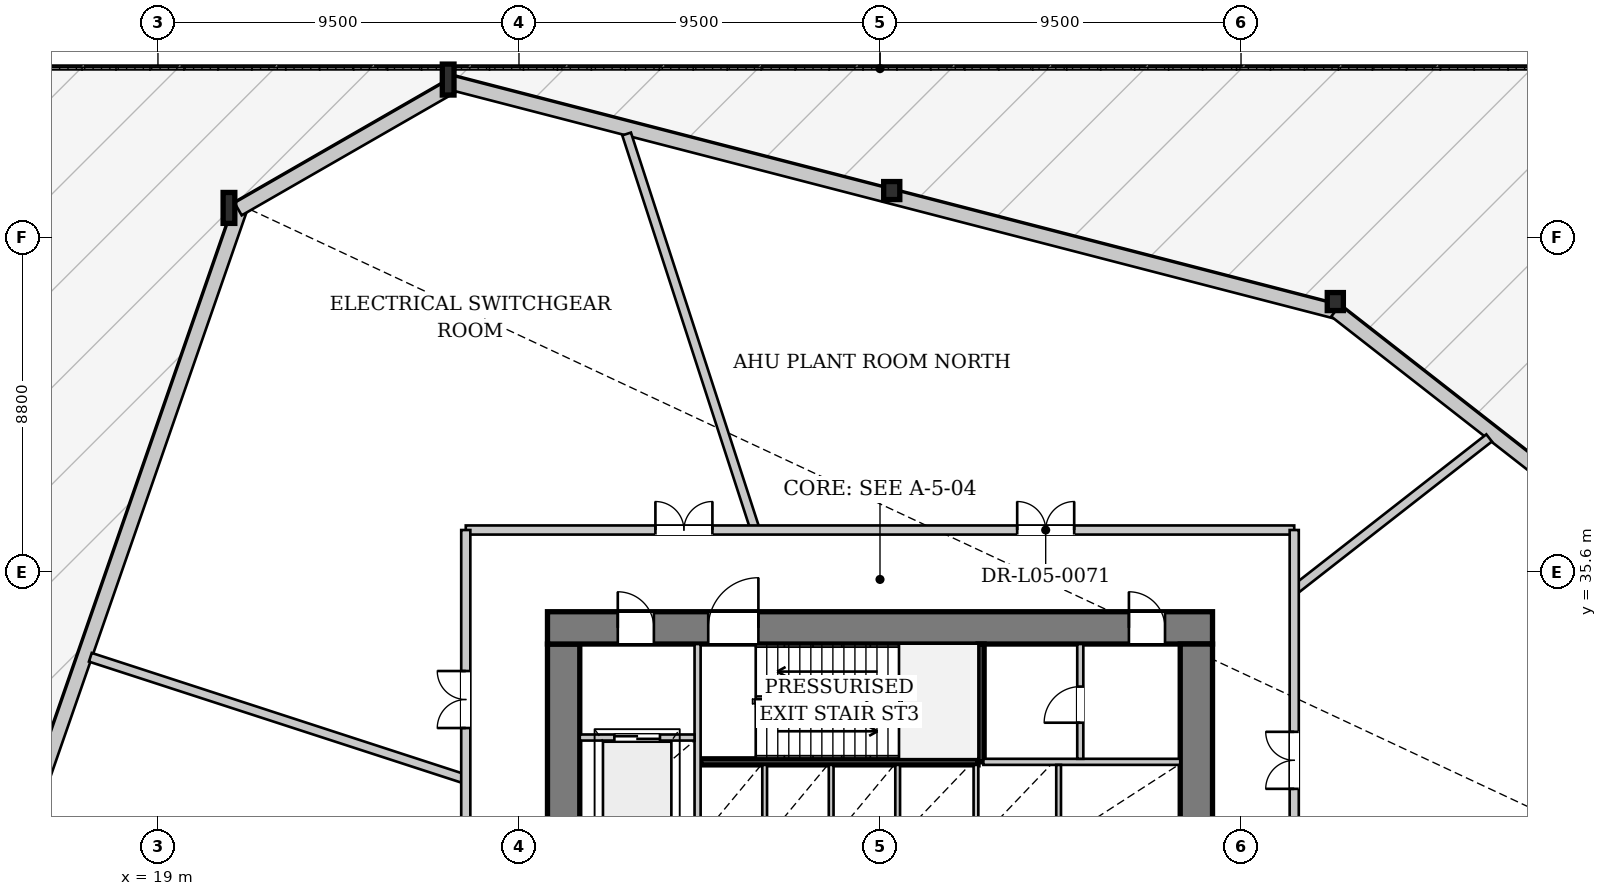
"""IFC4 building model, lengths in metres.
Left out: names, types, materials, properties, quantities, classifications, styles, units other than length and angle.
Written with IfcOpenShell. Run it as: python <this file> out.ifc"""

import sys

from ifc_helpers import new_model, si_unit, direction, frame, frame_2d, origin, origin_2d, place, context, subcontext, project, spatial, rectangle, i_section, extrude, source, transform, mapped, element, fill, save


model = new_model("IFC4")
c1 = context("Model", 3, precision=1e-05, world=origin(), true_north=direction((0.0, 1.0)))
c2 = subcontext(c1, "Body", "Model", "MODEL_VIEW")
j1 = project(units=[si_unit("LENGTHUNIT", "METRE"), si_unit("PLANEANGLEUNIT", "RADIAN")], contexts=[c1])
p1 = place(None, origin())
s1 = spatial("IfcSite", under=j1, at=p1, CompositionType="ELEMENT")
p2 = place(p1, origin())
s2 = spatial("IfcBuilding", under=s1, at=p2, CompositionType="ELEMENT")
p3 = place(p2, frame((0.0, 0.0, 24.6)))
s3 = spatial("IfcBuildingStorey", under=s2, at=p3, CompositionType="ELEMENT", Elevation=24.6)
m1 = source(origin(), c2, "Body", "SweptSolid", [
    extrude(i_section(OverallWidth=0.424, OverallDepth=0.474, WebThickness=0.043, FlangeThickness=0.068, at=origin_2d()), origin(), (0.0, 0.0, 1.0), 4.546),
])
p4 = place(p3, frame((50.108, 42.617, 0.0), z_axis=(-0.055693121898, 0.041407325925, 0.997588948181), x_axis=(-0.596651654511, -0.802500344654, 0.0)))
e1 = element("IfcColumn", 1, at=p4, inside=s3, PredefinedType="COLUMN", context=c2, shape_type="MappedRepresentation", body=[
    mapped(m1, transform((0.0, 0.0, 0.0), x_axis=(1.0, 0.0, 0.0), y_axis=(0.0, 1.0, 0.0), z_axis=(0.0, 0.0, 1.0), scale=1.0)),
])
m2 = source(origin(), c2, "Body", "SweptSolid", [
    extrude(i_section(OverallWidth=0.424, OverallDepth=0.474, WebThickness=0.043, FlangeThickness=0.068, at=origin_2d()), origin(), (0.0, 0.0, 1.0), 4.545),
])
p5 = place(p3, frame((38.458, 45.629, 0.0), z_axis=(-0.065805870044, 0.001074381552, 0.997831866184), x_axis=(-0.016324355083, -0.999866748838, 0.0)))
e2 = element("IfcColumn", 2, at=p5, inside=s3, PredefinedType="COLUMN", context=c2, shape_type="MappedRepresentation", body=[
    mapped(m2, transform((0.0, 0.0, 0.0), x_axis=(1.0, 0.0, 0.0), y_axis=(0.0, 1.0, 0.0), z_axis=(0.0, 0.0, 1.0), scale=1.0)),
])
m3 = source(origin(), c2, "Body", "SweptSolid", [
    extrude(i_section(OverallWidth=0.308, OverallDepth=0.814, WebThickness=0.021, FlangeThickness=0.04, at=origin_2d()), origin(), (0.0, 0.0, 1.0), 4.552),
])
p6 = place(p3, frame((26.809, 48.642, 0.0), z_axis=(-0.075739179484, -0.03921058088, 0.996356415666), x_axis=(0.459747973035, -0.888049436287, 0.0)))
e3 = element("IfcColumn", 3, at=p6, inside=s3, PredefinedType="COLUMN", context=c2, shape_type="MappedRepresentation", body=[
    mapped(m3, transform((0.0, 0.0, 0.0), x_axis=(1.0, 0.0, 0.0), y_axis=(0.0, 1.0, 0.0), z_axis=(0.0, 0.0, 1.0), scale=1.0)),
])
m4 = source(origin(), c2, "Body", "SweptSolid", [
    extrude(i_section(OverallWidth=0.308, OverallDepth=0.814, WebThickness=0.021, FlangeThickness=0.04, at=origin_2d()), origin(), (0.0, 0.0, 1.0), 4.552),
])
p7 = place(p3, frame((21.014, 45.309, 0.0), z_axis=(-0.064088836762, -0.059101169968, 0.996192588163), x_axis=(0.677922317054, -0.735133547078, 0.0)))
e4 = element("IfcColumn", 4, at=p7, inside=s3, PredefinedType="COLUMN", context=c2, shape_type="MappedRepresentation", body=[
    mapped(m4, transform((0.0, 0.0, 0.0), x_axis=(1.0, 0.0, 0.0), y_axis=(0.0, 1.0, 0.0), z_axis=(0.0, 0.0, 1.0), scale=1.0)),
])
p8 = place(p3, frame((15.064, 27.6, 0.0), z_axis=(0.0, 0.0, 1.0), x_axis=(0.328121673654, 0.944635467934, 0.0)))
e5 = element("IfcWall", 5, at=p8, inside=s3, PredefinedType="SOLIDWALL", context=c2, shape_type="SweptSolid", body=[
    extrude(rectangle(XDim=18.681, YDim=0.38, at=frame_2d((9.34, 0.0))), origin(), (0.0, 0.0, 1.0), 3.742),
])
p9 = place(p3, frame((21.109, 45.145, 0.0), z_axis=(0.0, 0.0, 1.0), x_axis=(0.866875523959, 0.498524649301, 0.0)))
e6 = element("IfcWall", 6, at=p9, inside=s3, PredefinedType="SOLIDWALL", context=c2, shape_type="SweptSolid", body=[
    extrude(rectangle(XDim=6.684, YDim=0.38, at=frame_2d((3.342, 0.0))), origin(), (0.0, 0.0, 1.0), 3.742),
])
p10 = place(p3, frame((26.761, 48.458, 0.0), z_axis=(0.0, 0.0, 1.0), x_axis=(0.968155984644, -0.250347736955, 0.0)))
e7 = element("IfcWall", 7, at=p10, inside=s3, PredefinedType="SOLIDWALL", context=c2, shape_type="SweptSolid", body=[
    extrude(rectangle(XDim=24.065, YDim=0.38, at=frame_2d((12.033, 0.0))), origin(), (0.0, 0.0, 1.0), 3.742),
])
p11 = place(p3, frame((49.991, 42.467, 0.0), z_axis=(0.0, 0.0, 1.0), x_axis=(0.788071128721, -0.615584190892, 0.0)))
e8 = element("IfcWall", 8, at=p11, inside=s3, PredefinedType="SOLIDWALL", context=c2, shape_type="SweptSolid", body=[
    extrude(rectangle(XDim=24.065, YDim=0.38, at=frame_2d((12.032, 0.0))), origin(), (0.0, 0.0, 1.0), 3.742),
])
p12 = place(p3, frame((29.675, 19.5, 0.0), z_axis=(0.0, 0.0, 1.0), x_axis=(0.0, 1.0, 0.0)))
e9 = element("IfcWall", 9, at=p12, inside=s3, PredefinedType="SHEAR", context=c2, shape_type="SweptSolid", body=[
    extrude(rectangle(XDim=14.2, YDim=0.85, at=frame_2d((7.1, 0.0))), origin(), (0.0, 0.0, 1.0), 4.45),
])
p13 = place(p12, frame((7.42, 0.0, 0.0)))
e10 = element("IfcOpeningElement", 10, at=p13, cuts=e9, PredefinedType="OPENING", context=c2, shape_type="SweptSolid", body=[
    extrude(rectangle(XDim=1.6, YDim=2.2, at=frame_2d((0.8, 1.1))), frame((0.0, 0.435, 0.0), z_axis=(0.0, -1.0, 0.0), x_axis=(1.0, 0.0, 0.0)), (0.0, 0.0, 1.0), 0.87),
])
p14 = place(p3, frame((29.25, 34.125, 0.0), z_axis=(0.0, 0.0, 1.0), x_axis=(1.0, 0.0, 0.0)))
e11 = element("IfcWall", 11, at=p14, inside=s3, PredefinedType="SHEAR", context=c2, shape_type="SweptSolid", body=[
    extrude(rectangle(XDim=17.5, YDim=0.85, at=frame_2d((8.75, 0.0))), origin(), (0.0, 0.0, 1.0), 4.45),
])
p15 = place(p14, frame((1.85, 0.0, 0.0)))
e12 = element("IfcOpeningElement", 12, at=p15, cuts=e11, PredefinedType="OPENING", context=c2, shape_type="SweptSolid", body=[
    extrude(rectangle(XDim=0.95, YDim=2.1, at=frame_2d((0.475, 1.05))), frame((0.0, 0.435, 0.0), z_axis=(0.0, -1.0, 0.0), x_axis=(1.0, 0.0, 0.0)), (0.0, 0.0, 1.0), 0.87),
])
p16 = place(p14, frame((4.23, 0.0, 0.0)))
e13 = element("IfcOpeningElement", 13, at=p16, cuts=e11, PredefinedType="OPENING", context=c2, shape_type="SweptSolid", body=[
    extrude(rectangle(XDim=1.32, YDim=2.2, at=frame_2d((0.66, 1.1))), frame((0.0, 0.435, 0.0), z_axis=(0.0, -1.0, 0.0), x_axis=(1.0, 0.0, 0.0)), (0.0, 0.0, 1.0), 0.87),
])
p17 = place(p14, frame((15.3, 0.0, 0.0)))
e14 = element("IfcOpeningElement", 14, at=p17, cuts=e11, PredefinedType="OPENING", context=c2, shape_type="SweptSolid", body=[
    extrude(rectangle(XDim=0.95, YDim=2.1, at=frame_2d((0.475, 1.05))), frame((0.0, 0.435, 0.0), z_axis=(0.0, -1.0, 0.0), x_axis=(1.0, 0.0, 0.0)), (0.0, 0.0, 1.0), 0.87),
])
p18 = place(p3, frame((46.325, 33.7, 0.0), z_axis=(0.0, 0.0, 1.0), x_axis=(0.0, -1.0, 0.0)))
e15 = element("IfcWall", 15, at=p18, inside=s3, PredefinedType="SHEAR", context=c2, shape_type="SweptSolid", body=[
    extrude(rectangle(XDim=14.2, YDim=0.85, at=frame_2d((7.1, 0.0))), origin(), (0.0, 0.0, 1.0), 4.45),
])
p19 = place(p18, frame((5.18, 0.0, 0.0)))
e16 = element("IfcOpeningElement", 16, at=p19, cuts=e15, PredefinedType="OPENING", context=c2, shape_type="SweptSolid", body=[
    extrude(rectangle(XDim=1.6, YDim=2.2, at=frame_2d((0.8, 1.1))), frame((0.0, 0.435, 0.0), z_axis=(0.0, -1.0, 0.0), x_axis=(1.0, 0.0, 0.0)), (0.0, 0.0, 1.0), 0.87),
])
p20 = place(p3, frame((33.28, 30.6, 0.0), z_axis=(0.0, 0.0, 1.0), x_axis=(1.0, 0.0, 0.0)))
e17 = element("IfcWall", 17, at=p20, inside=s3, PredefinedType="PARTITIONING", context=c2, shape_type="SweptSolid", body=[
    extrude(rectangle(XDim=7.3, YDim=0.16, at=frame_2d((3.65, 0.0))), origin(), (0.0, 0.0, 1.0), 4.45),
])
p21 = place(p3, frame((40.66, 30.6, 0.0), z_axis=(0.0, 0.0, 1.0), x_axis=(0.0, 1.0, 0.0)))
e18 = element("IfcWall", 18, at=p21, inside=s3, PredefinedType="PARTITIONING", context=c2, shape_type="SweptSolid", body=[
    extrude(rectangle(XDim=3.1, YDim=0.16, at=frame_2d((1.55, 0.0))), origin(), (0.0, 0.0, 1.0), 4.45),
])
p22 = place(p3, frame((33.2, 28.44, 0.0), z_axis=(0.0, 0.0, 1.0), x_axis=(0.0, 1.0, 0.0)))
e19 = element("IfcWall", 19, at=p22, inside=s3, PredefinedType="PARTITIONING", context=c2, shape_type="SweptSolid", body=[
    extrude(rectangle(XDim=5.26, YDim=0.16, at=frame_2d((2.63, 0.0))), origin(), (0.0, 0.0, 1.0), 4.45),
])
p23 = place(p3, frame((30.1, 31.24, 0.0), z_axis=(0.0, 0.0, 1.0), x_axis=(1.0, 0.0, 0.0)))
e20 = element("IfcWall", 20, at=p23, inside=s3, PredefinedType="PARTITIONING", context=c2, shape_type="SweptSolid", body=[
    extrude(rectangle(XDim=3.02, YDim=0.16, at=frame_2d((1.51, 0.0))), origin(), (0.0, 0.0, 1.0), 4.45),
])
p24 = place(p23, frame((0.91, 0.0, 0.0)))
e21 = element("IfcOpeningElement", 21, at=p24, cuts=e20, PredefinedType="OPENING", context=c2, shape_type="SweptSolid", body=[
    extrude(rectangle(XDim=1.2, YDim=2.2, at=frame_2d((0.6, 1.1))), frame((0.0, 0.09, 0.0), z_axis=(0.0, -1.0, 0.0), x_axis=(1.0, 0.0, 0.0)), (0.0, 0.0, 1.0), 0.18),
])
p25 = place(p3, frame((40.72, 30.6, 0.0), z_axis=(0.0, 0.0, 1.0), x_axis=(1.0, 0.0, 0.0)))
e22 = element("IfcWall", 22, at=p25, inside=s3, PredefinedType="PARTITIONING", context=c2, shape_type="SweptSolid", body=[
    extrude(rectangle(XDim=5.18, YDim=0.16, at=frame_2d((2.59, 0.0))), origin(), (0.0, 0.0, 1.0), 4.45),
])
for number, where, z_axis, x_axis in (
    (23, (34.965, 28.6, 0.0), (0.0, 0.0, 1.0), (0.0, 1.0, 0.0)),
    (24, (36.715, 28.6, 0.0), (0.0, 0.0, 1.0), (0.0, 1.0, 0.0)),
    (25, (38.465, 28.6, 0.0), (0.0, 0.0, 1.0), (0.0, 1.0, 0.0)),
    (26, (40.525, 28.6, 0.0), (0.0, 0.0, 1.0), (0.0, 1.0, 0.0)),
    (27, (42.7, 28.6, 0.0), (0.0, 0.0, 1.0), (0.0, 1.0, 0.0)),
):
    element("IfcWall", number, at=place(p3, frame(where, z_axis=z_axis, x_axis=x_axis)), inside=s3, PredefinedType="PARTITIONING", context=c2, shape_type="SweptSolid", body=[
        extrude(rectangle(XDim=1.92, YDim=0.125, at=frame_2d((0.96, 0.0))), origin(), (0.0, 0.0, 1.0), 4.45),
    ])
p26 = place(p3, frame((43.27, 30.68, 0.0), z_axis=(0.0, 0.0, 1.0), x_axis=(0.0, 1.0, 0.0)))
e28 = element("IfcWall", 28, at=p26, inside=s3, PredefinedType="PARTITIONING", context=c2, shape_type="SweptSolid", body=[
    extrude(rectangle(XDim=3.02, YDim=0.16, at=frame_2d((1.51, 0.0))), origin(), (0.0, 0.0, 1.0), 4.45),
])
p27 = place(p26, frame((0.95, 0.0, 0.0)))
e29 = element("IfcOpeningElement", 29, at=p27, cuts=e28, PredefinedType="OPENING", context=c2, shape_type="SweptSolid", body=[
    extrude(rectangle(XDim=0.95, YDim=2.1, at=frame_2d((0.475, 1.05))), frame((0.0, 0.09, 0.0), z_axis=(0.0, -1.0, 0.0), x_axis=(1.0, 0.0, 0.0)), (0.0, 0.0, 1.0), 0.18),
])
p28 = place(p3, frame((48.9, 35.116, 0.0), z_axis=(0.0, 0.0, 1.0), x_axis=(0.788019255292, 0.61565059351, 0.0)))
e30 = element("IfcWall", 30, at=p28, inside=s3, PredefinedType="PARTITIONING", context=c2, shape_type="SweptSolid", body=[
    extrude(rectangle(XDim=6.508, YDim=0.24, at=frame_2d((3.254, 0.0))), origin(), (0.0, 0.0, 1.0), 4.45),
])
p29 = place(p3, frame((34.718, 36.7, 0.0), z_axis=(0.0, 0.0, 1.0), x_axis=(-0.308999413899, 0.951062228358, 0.0)))
e31 = element("IfcWall", 31, at=p29, inside=s3, PredefinedType="PARTITIONING", context=c2, shape_type="SweptSolid", body=[
    extrude(rectangle(XDim=10.957, YDim=0.24, at=frame_2d((5.479, 0.0))), origin(), (0.0, 0.0, 1.0), 4.45),
])
p30 = place(p3, frame((27.1, 30.142, 0.0), z_axis=(0.0, 0.0, 1.0), x_axis=(-0.951057900691, 0.309012733611, 0.0)))
e32 = element("IfcWall", 32, at=p30, inside=s3, PredefinedType="PARTITIONING", context=c2, shape_type="SweptSolid", body=[
    extrude(rectangle(XDim=10.388, YDim=0.24, at=frame_2d((5.194, 0.0))), origin(), (0.0, 0.0, 1.0), 4.45),
])
p31 = place(p3, frame((27.1, 36.7, 0.0), z_axis=(0.0, 0.0, 1.0), x_axis=(1.0, 0.0, 0.0)))
e33 = element("IfcWall", 33, at=p31, inside=s3, PredefinedType="PARTITIONING", context=c2, shape_type="SweptSolid", body=[
    extrude(rectangle(XDim=21.8, YDim=0.24, at=frame_2d((10.9, 0.0))), origin(), (0.0, 0.0, 1.0), 4.45),
])
p32 = place(p31, frame((4.99, 0.0, 0.0)))
e34 = element("IfcOpeningElement", 34, at=p32, cuts=e33, PredefinedType="OPENING", context=c2, shape_type="SweptSolid", body=[
    extrude(rectangle(XDim=1.5, YDim=2.25, at=frame_2d((0.75, 1.125))), frame((0.0, 0.13, 0.0), z_axis=(0.0, -1.0, 0.0), x_axis=(1.0, 0.0, 0.0)), (0.0, 0.0, 1.0), 0.26),
])
p33 = place(p31, frame((14.51, 0.0, 0.0)))
e35 = element("IfcOpeningElement", 35, at=p33, cuts=e33, PredefinedType="OPENING", context=c2, shape_type="SweptSolid", body=[
    extrude(rectangle(XDim=1.5, YDim=2.25, at=frame_2d((0.75, 1.125))), frame((0.0, 0.13, 0.0), z_axis=(0.0, -1.0, 0.0), x_axis=(1.0, 0.0, 0.0)), (0.0, 0.0, 1.0), 0.26),
])
p34 = place(p3, frame((27.1, 16.5, 0.0), z_axis=(0.0, 0.0, 1.0), x_axis=(0.0, 1.0, 0.0)))
e36 = element("IfcWall", 36, at=p34, inside=s3, PredefinedType="PARTITIONING", context=c2, shape_type="SweptSolid", body=[
    extrude(rectangle(XDim=20.2, YDim=0.24, at=frame_2d((10.1, 0.0))), origin(), (0.0, 0.0, 1.0), 4.45),
])
p35 = place(p34, frame((5.31, 0.0, 0.0)))
e37 = element("IfcOpeningElement", 37, at=p35, cuts=e36, PredefinedType="OPENING", context=c2, shape_type="SweptSolid", body=[
    extrude(rectangle(XDim=1.5, YDim=2.25, at=frame_2d((0.75, 1.125))), frame((0.0, 0.13, 0.0), z_axis=(0.0, -1.0, 0.0), x_axis=(1.0, 0.0, 0.0)), (0.0, 0.0, 1.0), 0.26),
])
p36 = place(p34, frame((14.99, 0.0, 0.0)))
e38 = element("IfcOpeningElement", 38, at=p36, cuts=e36, PredefinedType="OPENING", context=c2, shape_type="SweptSolid", body=[
    extrude(rectangle(XDim=1.5, YDim=2.25, at=frame_2d((0.75, 1.125))), frame((0.0, 0.13, 0.0), z_axis=(0.0, -1.0, 0.0), x_axis=(1.0, 0.0, 0.0)), (0.0, 0.0, 1.0), 0.26),
])
p37 = place(p3, frame((48.9, 16.5, 0.0), z_axis=(0.0, 0.0, 1.0), x_axis=(0.0, 1.0, 0.0)))
e39 = element("IfcWall", 39, at=p37, inside=s3, PredefinedType="PARTITIONING", context=c2, shape_type="SweptSolid", body=[
    extrude(rectangle(XDim=20.2, YDim=0.24, at=frame_2d((10.1, 0.0))), origin(), (0.0, 0.0, 1.0), 4.45),
])
p38 = place(p37, frame((5.31, 0.0, 0.0)))
e40 = element("IfcOpeningElement", 40, at=p38, cuts=e39, PredefinedType="OPENING", context=c2, shape_type="SweptSolid", body=[
    extrude(rectangle(XDim=1.5, YDim=2.25, at=frame_2d((0.75, 1.125))), frame((0.0, 0.13, 0.0), z_axis=(0.0, -1.0, 0.0), x_axis=(1.0, 0.0, 0.0)), (0.0, 0.0, 1.0), 0.26),
])
p39 = place(p37, frame((13.39, 0.0, 0.0)))
e41 = element("IfcOpeningElement", 41, at=p39, cuts=e39, PredefinedType="OPENING", context=c2, shape_type="SweptSolid", body=[
    extrude(rectangle(XDim=1.5, YDim=2.25, at=frame_2d((0.75, 1.125))), frame((0.0, 0.13, 0.0), z_axis=(0.0, -1.0, 0.0), x_axis=(1.0, 0.0, 0.0)), (0.0, 0.0, 1.0), 0.26),
])
m5 = source(origin(), c2, "Body", "SweptSolid", [
    extrude(rectangle(XDim=0.95, YDim=2.1, at=frame_2d((0.475, 1.05))), frame((0.0, 0.025, 0.0), z_axis=(0.0, -1.0, 0.0), x_axis=(1.0, 0.0, 0.0)), (0.0, 0.0, 1.0), 0.05),
])
p40 = place(p15, origin())
e42 = element("IfcDoor", 42, at=p40, inside=s3, OperationType="SINGLE_SWING_LEFT", PredefinedType="DOOR", context=c2, shape_type="MappedRepresentation", body=[
    mapped(m5, transform((0.0, 0.0, 0.0), x_axis=(1.0, 0.0, 0.0), y_axis=(0.0, 1.0, 0.0), z_axis=(0.0, 0.0, 1.0), scale=1.0)),
])
fill(e12, e42)
m6 = source(origin(), c2, "Body", "SweptSolid", [
    extrude(rectangle(XDim=1.32, YDim=2.2, at=frame_2d((0.66, 1.1))), frame((0.0, 0.025, 0.0), z_axis=(0.0, -1.0, 0.0), x_axis=(1.0, 0.0, 0.0)), (0.0, 0.0, 1.0), 0.05),
])
p41 = place(p16, origin())
e43 = element("IfcDoor", 43, at=p41, inside=s3, OperationType="SINGLE_SWING_RIGHT", PredefinedType="DOOR", context=c2, shape_type="MappedRepresentation", body=[
    mapped(m6, transform((0.0, 0.0, 0.0), x_axis=(1.0, 0.0, 0.0), y_axis=(0.0, 1.0, 0.0), z_axis=(0.0, 0.0, 1.0), scale=1.0)),
])
fill(e13, e43)
m7 = source(origin(), c2, "Body", "SweptSolid", [
    extrude(rectangle(XDim=1.2, YDim=2.2, at=frame_2d((0.6, 1.1))), frame((0.0, 0.025, 0.0), z_axis=(0.0, -1.0, 0.0), x_axis=(1.0, 0.0, 0.0)), (0.0, 0.0, 1.0), 0.05),
])
p42 = place(p24, origin())
e44 = element("IfcDoor", 44, at=p42, inside=s3, OperationType="DOUBLE_DOOR_SLIDING", PredefinedType="DOOR", context=c2, shape_type="MappedRepresentation", body=[
    mapped(m7, transform((0.0, 0.0, 0.0), x_axis=(1.0, 0.0, 0.0), y_axis=(0.0, 1.0, 0.0), z_axis=(0.0, 0.0, 1.0), scale=1.0)),
])
fill(e21, e44)
p43 = place(p27, origin())
e45 = element("IfcDoor", 45, at=p43, inside=s3, OperationType="SINGLE_SWING_LEFT", PredefinedType="DOOR", context=c2, shape_type="MappedRepresentation", body=[
    mapped(m5, transform((0.0, 0.0, 0.0), x_axis=(1.0, 0.0, 0.0), y_axis=(0.0, 1.0, 0.0), z_axis=(0.0, 0.0, 1.0), scale=1.0)),
])
fill(e29, e45)
p44 = place(p17, origin())
e46 = element("IfcDoor", 46, at=p44, inside=s3, OperationType="SINGLE_SWING_LEFT", PredefinedType="DOOR", context=c2, shape_type="MappedRepresentation", body=[
    mapped(m5, transform((0.0, 0.0, 0.0), x_axis=(1.0, 0.0, 0.0), y_axis=(0.0, 1.0, 0.0), z_axis=(0.0, 0.0, 1.0), scale=1.0)),
])
fill(e14, e46)
m8 = source(origin(), c2, "Body", "SweptSolid", [
    extrude(rectangle(XDim=1.5, YDim=2.25, at=frame_2d((0.75, 1.125))), frame((0.0, 0.025, 0.0), z_axis=(0.0, -1.0, 0.0), x_axis=(1.0, 0.0, 0.0)), (0.0, 0.0, 1.0), 0.05),
])
p45 = place(p32, origin())
e47 = element("IfcDoor", 47, at=p45, inside=s3, OperationType="DOUBLE_DOOR_SINGLE_SWING", PredefinedType="DOOR", context=c2, shape_type="MappedRepresentation", body=[
    mapped(m8, transform((0.0, 0.0, 0.0), x_axis=(1.0, 0.0, 0.0), y_axis=(0.0, 1.0, 0.0), z_axis=(0.0, 0.0, 1.0), scale=1.0)),
])
fill(e34, e47)
p46 = place(p33, origin())
e48 = element("IfcDoor", 48, at=p46, inside=s3, OperationType="DOUBLE_DOOR_SINGLE_SWING", PredefinedType="DOOR", context=c2, shape_type="MappedRepresentation", body=[
    mapped(m8, transform((0.0, 0.0, 0.0), x_axis=(1.0, 0.0, 0.0), y_axis=(0.0, 1.0, 0.0), z_axis=(0.0, 0.0, 1.0), scale=1.0)),
])
fill(e35, e48)
p47 = place(p36, origin())
e49 = element("IfcDoor", 49, at=p47, inside=s3, OperationType="DOUBLE_DOOR_SINGLE_SWING", PredefinedType="DOOR", context=c2, shape_type="MappedRepresentation", body=[
    mapped(m8, transform((0.0, 0.0, 0.0), x_axis=(1.0, 0.0, 0.0), y_axis=(0.0, 1.0, 0.0), z_axis=(0.0, 0.0, 1.0), scale=1.0)),
])
fill(e38, e49)
p48 = place(p39, origin())
e50 = element("IfcDoor", 50, at=p48, inside=s3, OperationType="DOUBLE_DOOR_SINGLE_SWING", PredefinedType="DOOR", context=c2, shape_type="MappedRepresentation", body=[
    mapped(m8, transform((0.0, 0.0, 0.0), x_axis=(1.0, 0.0, 0.0), y_axis=(0.0, 1.0, 0.0), z_axis=(0.0, 0.0, 1.0), scale=1.0)),
])
fill(e41, e50)
save(model, sys.argv[1])
